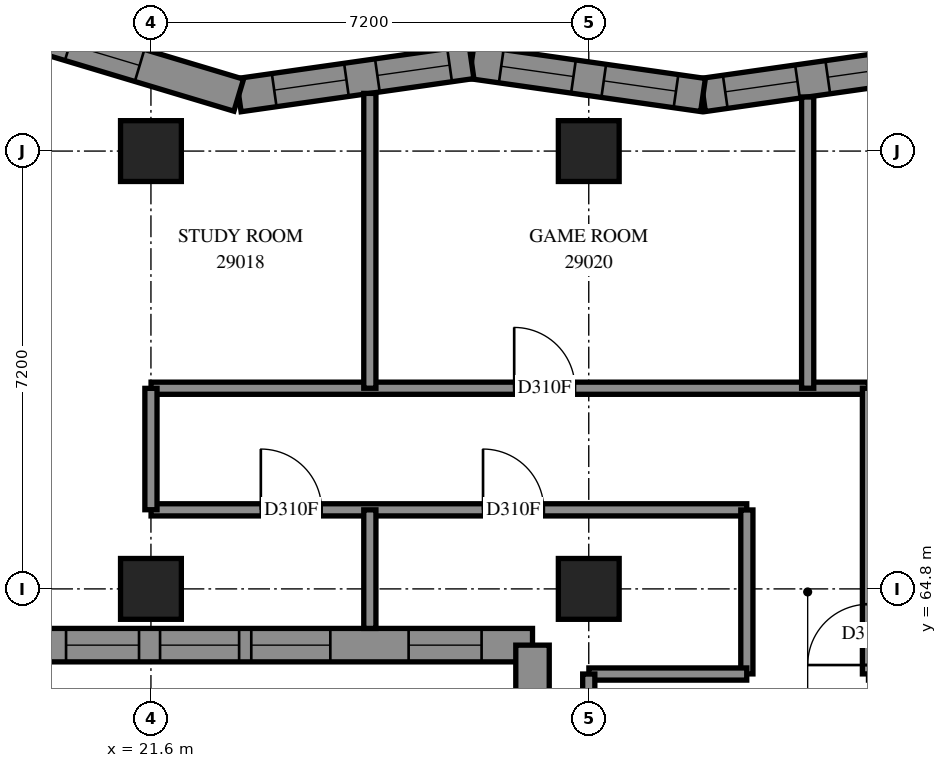
"""IFC4 building model, lengths in metres.
Left out: names, types, materials, properties, quantities, classifications, styles, units other than length and angle.
Written with IfcOpenShell. Run it as: python <this file> out.ifc"""

import sys

from ifc_helpers import new_model, si_unit, direction, frame, frame_2d, origin, origin_2d, place, context, subcontext, project, spatial, polyline, rectangle, outline, extrude, element, fill, save


model = new_model("IFC4")
c1 = context("Model", 3, precision=1e-05, world=origin(), true_north=direction((0.0, 1.0)))
c2 = subcontext(c1, "Body", "Model", "MODEL_VIEW")
j1 = project(units=[si_unit("LENGTHUNIT", "METRE"), si_unit("PLANEANGLEUNIT", "RADIAN")], contexts=[c1])
p1 = place(None, origin())
s1 = spatial("IfcSite", under=j1, at=p1, CompositionType="ELEMENT")
p2 = place(p1, origin())
s2 = spatial("IfcBuilding", under=s1, at=p2, CompositionType="ELEMENT")
p3 = place(p2, frame((0.0, 0.0, 108.4)))
s3 = spatial("IfcBuildingStorey", under=s2, at=p3, CompositionType="ELEMENT", Elevation=108.4)
for number, where, z_axis, x_axis in (
    (1, (21.6, 64.8, 0.0), (0.0, 0.0, 1.0), (1.0, 0.0, 0.0)),
    (2, (21.6, 72.0, 0.0), (0.0, 0.0, 1.0), (1.0, 0.0, 0.0)),
    (3, (28.8, 64.8, 0.0), (0.0, 0.0, 1.0), (1.0, 0.0, 0.0)),
    (4, (28.8, 72.0, 0.0), (0.0, 0.0, 1.0), (1.0, 0.0, 0.0)),
):
    element("IfcColumn", number, at=place(p3, frame(where, z_axis=z_axis, x_axis=x_axis)), inside=s3, PredefinedType="COLUMN", context=c2, shape_type="SweptSolid", body=[
        extrude(rectangle(XDim=1.0, YDim=1.0, at=origin_2d()), origin(), (0.0, 0.0, 1.0), 3.1),
    ])
p4 = place(p3, frame((34.486, 73.464, 0.0), z_axis=(0.0, 0.0, 1.0), x_axis=(-0.990016994, -0.1409480459, 0.0)))
e5 = element("IfcWall", 5, at=p4, inside=s3, PredefinedType="SOLIDWALL", context=c2, shape_type="SweptSolid", body=[
    extrude(outline(polyline([(-0.039, -0.275), (3.806, -0.275), (3.885, 0.275), (0.039, 0.275), (-0.039, -0.275)])), origin(), (0.0, 0.0, 1.0), 3.1),
])
p5 = place(p4, frame((0.573, 0.0, 0.5)))
e6 = element("IfcOpeningElement", 6, at=p5, cuts=e5, PredefinedType="OPENING", context=c2, shape_type="SweptSolid", body=[
    extrude(rectangle(XDim=1.2, YDim=2.45, at=frame_2d((0.6, 1.225))), frame((0.0, 0.285, 0.0), z_axis=(0.0, -1.0, 0.0), x_axis=(1.0, 0.0, 0.0)), (0.0, 0.0, 1.0), 0.57),
])
p6 = place(p4, frame((2.276, 0.0, 0.5)))
e7 = element("IfcOpeningElement", 7, at=p6, cuts=e5, PredefinedType="OPENING", context=c2, shape_type="SweptSolid", body=[
    extrude(rectangle(XDim=1.2, YDim=2.45, at=frame_2d((0.6, 1.225))), frame((0.0, 0.285, 0.0), z_axis=(0.0, -1.0, 0.0), x_axis=(1.0, 0.0, 0.0)), (0.0, 0.0, 1.0), 0.57),
])
p7 = place(p3, frame((30.679, 72.922, 0.0), z_axis=(0.0, 0.0, 1.0), x_axis=(-0.990016994, 0.1409480459, 0.0)))
e8 = element("IfcWall", 8, at=p7, inside=s3, PredefinedType="SOLIDWALL", context=c2, shape_type="SweptSolid", body=[
    extrude(outline(polyline([(0.039, -0.275), (3.885, -0.275), (3.806, 0.275), (-0.039, 0.275), (0.039, -0.275)])), origin(), (0.0, 0.0, 1.0), 3.1),
])
p8 = place(p7, frame((0.449, 0.0, 0.5)))
e9 = element("IfcOpeningElement", 9, at=p8, cuts=e8, PredefinedType="OPENING", context=c2, shape_type="SweptSolid", body=[
    extrude(rectangle(XDim=1.2, YDim=2.45, at=frame_2d((0.6, 1.225))), frame((0.0, 0.285, 0.0), z_axis=(0.0, -1.0, 0.0), x_axis=(1.0, 0.0, 0.0)), (0.0, 0.0, 1.0), 0.57),
])
p9 = place(p7, frame((2.152, 0.0, 0.5)))
e10 = element("IfcOpeningElement", 10, at=p9, cuts=e8, PredefinedType="OPENING", context=c2, shape_type="SweptSolid", body=[
    extrude(rectangle(XDim=1.2, YDim=2.45, at=frame_2d((0.6, 1.225))), frame((0.0, 0.285, 0.0), z_axis=(0.0, -1.0, 0.0), x_axis=(1.0, 0.0, 0.0)), (0.0, 0.0, 1.0), 0.57),
])
p10 = place(p3, frame((26.872, 73.464, 0.0), z_axis=(0.0, 0.0, 1.0), x_axis=(-0.9900171381, -0.1409470338, 0.0)))
e11 = element("IfcWall", 11, at=p10, inside=s3, PredefinedType="SOLIDWALL", context=c2, shape_type="SweptSolid", body=[
    extrude(outline(polyline([(-0.039, -0.275), (3.806, -0.275), (3.927, 0.275), (0.039, 0.275), (-0.039, -0.275)])), origin(), (0.0, 0.0, 1.0), 3.1),
])
p11 = place(p10, frame((0.364, 0.0, 0.5)))
e12 = element("IfcOpeningElement", 12, at=p11, cuts=e11, PredefinedType="OPENING", context=c2, shape_type="SweptSolid", body=[
    extrude(rectangle(XDim=1.2, YDim=2.45, at=frame_2d((0.6, 1.225))), frame((0.0, 0.285, 0.0), z_axis=(0.0, -1.0, 0.0), x_axis=(1.0, 0.0, 0.0)), (0.0, 0.0, 1.0), 0.57),
])
p12 = place(p10, frame((2.078, 0.0, 0.5)))
e13 = element("IfcOpeningElement", 13, at=p12, cuts=e11, PredefinedType="OPENING", context=c2, shape_type="SweptSolid", body=[
    extrude(rectangle(XDim=1.2, YDim=2.45, at=frame_2d((0.6, 1.225))), frame((0.0, 0.285, 0.0), z_axis=(0.0, -1.0, 0.0), x_axis=(1.0, 0.0, 0.0)), (0.0, 0.0, 1.0), 0.57),
])
p13 = place(p3, frame((23.044, 72.919, 0.0), z_axis=(0.0, 0.0, 1.0), x_axis=(-0.9578315412, 0.2873303652, 0.0)))
e14 = element("IfcWall", 14, at=p13, inside=s3, PredefinedType="SOLIDWALL", context=c2, shape_type="SweptSolid", body=[
    extrude(outline(polyline([(0.06, -0.275), (4.035, -0.275), (3.296, 0.275), (-0.06, 0.275), (0.06, -0.275)])), origin(), (0.0, 0.0, 1.0), 3.1),
])
p14 = place(p13, frame((1.702, 0.0, 0.5)))
e15 = element("IfcOpeningElement", 15, at=p14, cuts=e14, PredefinedType="OPENING", context=c2, shape_type="SweptSolid", body=[
    extrude(rectangle(XDim=1.2, YDim=2.45, at=frame_2d((0.6, 1.225))), frame((0.0, 0.285, 0.0), z_axis=(0.0, -1.0, 0.0), x_axis=(1.0, 0.0, 0.0)), (0.0, 0.0, 1.0), 0.57),
])
p15 = place(p3, frame((19.533, 63.875, 0.0), z_axis=(0.0, 0.0, 1.0), x_axis=(1.0, 0.0, 0.0)))
e16 = element("IfcWall", 16, at=p15, inside=s3, PredefinedType="SOLIDWALL", context=c2, shape_type="SweptSolid", body=[
    extrude(outline(polyline([(-0.275, -0.275), (8.067, -0.275), (8.617, 0.275), (0.275, 0.275), (-0.275, -0.275)])), origin(), (0.0, 0.0, 1.0), 3.1),
])
p16 = place(p15, frame((2.217, 0.0, 0.5)))
e17 = element("IfcOpeningElement", 17, at=p16, cuts=e16, PredefinedType="OPENING", context=c2, shape_type="SweptSolid", body=[
    extrude(rectangle(XDim=1.3, YDim=2.45, at=frame_2d((0.65, 1.225))), frame((0.0, 0.285, 0.0), z_axis=(0.0, -1.0, 0.0), x_axis=(1.0, 0.0, 0.0)), (0.0, 0.0, 1.0), 0.57),
])
p17 = place(p15, frame((3.717, 0.0, 0.5)))
e18 = element("IfcOpeningElement", 18, at=p17, cuts=e16, PredefinedType="OPENING", context=c2, shape_type="SweptSolid", body=[
    extrude(rectangle(XDim=1.3, YDim=2.45, at=frame_2d((0.65, 1.225))), frame((0.0, 0.285, 0.0), z_axis=(0.0, -1.0, 0.0), x_axis=(1.0, 0.0, 0.0)), (0.0, 0.0, 1.0), 0.57),
])
p18 = place(p15, frame((0.671, 0.0, 0.5)))
e19 = element("IfcOpeningElement", 19, at=p18, cuts=e16, PredefinedType="OPENING", context=c2, shape_type="SweptSolid", body=[
    extrude(rectangle(XDim=1.2, YDim=2.45, at=frame_2d((0.6, 1.225))), frame((0.0, 0.285, 0.0), z_axis=(0.0, -1.0, 0.0), x_axis=(1.0, 0.0, 0.0)), (0.0, 0.0, 1.0), 0.57),
])
p19 = place(p15, frame((6.304, 0.0, 0.5)))
e20 = element("IfcOpeningElement", 20, at=p19, cuts=e16, PredefinedType="OPENING", context=c2, shape_type="SweptSolid", body=[
    extrude(rectangle(XDim=1.2, YDim=2.45, at=frame_2d((0.6, 1.225))), frame((0.0, 0.285, 0.0), z_axis=(0.0, -1.0, 0.0), x_axis=(1.0, 0.0, 0.0)), (0.0, 0.0, 1.0), 0.57),
])
p20 = place(p3, frame((27.875, 63.875, 0.0), z_axis=(0.0, 0.0, 1.0), x_axis=(0.0, -1.0, 0.0)))
e21 = element("IfcWall", 21, at=p20, inside=s3, PredefinedType="SOLIDWALL", context=c2, shape_type="SweptSolid", body=[
    extrude(outline(polyline([(0.275, -0.275), (8.617, -0.275), (8.067, 0.275), (-0.275, 0.275), (0.275, -0.275)])), origin(), (0.0, 0.0, 1.0), 3.1),
])
p21 = place(p20, frame((3.325, 0.0, 0.5)))
e22 = element("IfcOpeningElement", 22, at=p21, cuts=e21, PredefinedType="OPENING", context=c2, shape_type="SweptSolid", body=[
    extrude(rectangle(XDim=1.3, YDim=2.45, at=frame_2d((0.65, 1.225))), frame((0.0, 0.285, 0.0), z_axis=(0.0, -1.0, 0.0), x_axis=(1.0, 0.0, 0.0)), (0.0, 0.0, 1.0), 0.57),
])
p22 = place(p20, frame((4.975, 0.0, 0.5)))
e23 = element("IfcOpeningElement", 23, at=p22, cuts=e21, PredefinedType="OPENING", context=c2, shape_type="SweptSolid", body=[
    extrude(rectangle(XDim=1.3, YDim=2.45, at=frame_2d((0.65, 1.225))), frame((0.0, 0.285, 0.0), z_axis=(0.0, -1.0, 0.0), x_axis=(1.0, 0.0, 0.0)), (0.0, 0.0, 1.0), 0.57),
])
p23 = place(p20, frame((0.838, 0.0, 0.5)))
e24 = element("IfcOpeningElement", 24, at=p23, cuts=e21, PredefinedType="OPENING", context=c2, shape_type="SweptSolid", body=[
    extrude(rectangle(XDim=1.2, YDim=2.45, at=frame_2d((0.6, 1.225))), frame((0.0, 0.285, 0.0), z_axis=(0.0, -1.0, 0.0), x_axis=(1.0, 0.0, 0.0)), (0.0, 0.0, 1.0), 0.57),
])
p24 = place(p20, frame((6.471, 0.0, 0.5)))
e25 = element("IfcOpeningElement", 25, at=p24, cuts=e21, PredefinedType="OPENING", context=c2, shape_type="SweptSolid", body=[
    extrude(rectangle(XDim=1.2, YDim=2.45, at=frame_2d((0.6, 1.225))), frame((0.0, 0.285, 0.0), z_axis=(0.0, -1.0, 0.0), x_axis=(1.0, 0.0, 0.0)), (0.0, 0.0, 1.0), 0.57),
])
p25 = place(p3, frame((21.602, 68.1, 0.0), z_axis=(0.0, 0.0, 1.0), x_axis=(1.0, 0.0, 0.0)))
e26 = element("IfcWall", 26, at=p25, inside=s3, PredefinedType="PARTITIONING", context=c2, shape_type="SweptSolid", body=[
    extrude(rectangle(XDim=11.798, YDim=0.2, at=frame_2d((5.899, 0.0))), origin(), (0.0, 0.0, 1.0), 3.1),
])
p26 = place(p25, frame((5.972, 0.0, 0.0)))
e27 = element("IfcOpeningElement", 27, at=p26, cuts=e26, PredefinedType="OPENING", context=c2, shape_type="SweptSolid", body=[
    extrude(rectangle(XDim=1.0, YDim=2.1, at=frame_2d((0.5, 1.05))), frame((0.0, 0.11, 0.0), z_axis=(0.0, -1.0, 0.0), x_axis=(1.0, 0.0, 0.0)), (0.0, 0.0, 1.0), 0.22),
])
p27 = place(p3, frame((21.602, 66.1, 0.0), z_axis=(0.0, 0.0, 1.0), x_axis=(1.0, 0.0, 0.0)))
e28 = element("IfcWall", 28, at=p27, inside=s3, PredefinedType="PARTITIONING", context=c2, shape_type="SweptSolid", body=[
    extrude(rectangle(XDim=9.796, YDim=0.2, at=frame_2d((4.898, 0.0))), origin(), (0.0, 0.0, 1.0), 3.1),
])
p28 = place(p27, frame((1.805, 0.0, 0.0)))
e29 = element("IfcOpeningElement", 29, at=p28, cuts=e28, PredefinedType="OPENING", context=c2, shape_type="SweptSolid", body=[
    extrude(rectangle(XDim=1.0, YDim=2.1, at=frame_2d((0.5, 1.05))), frame((0.0, 0.11, 0.0), z_axis=(0.0, -1.0, 0.0), x_axis=(1.0, 0.0, 0.0)), (0.0, 0.0, 1.0), 0.22),
])
p29 = place(p27, frame((5.459, 0.0, 0.0)))
e30 = element("IfcOpeningElement", 30, at=p29, cuts=e28, PredefinedType="OPENING", context=c2, shape_type="SweptSolid", body=[
    extrude(rectangle(XDim=1.0, YDim=2.1, at=frame_2d((0.5, 1.05))), frame((0.0, 0.11, 0.0), z_axis=(0.0, -1.0, 0.0), x_axis=(1.0, 0.0, 0.0)), (0.0, 0.0, 1.0), 0.22),
])
p30 = place(p3, frame((25.2, 68.1, 0.0), z_axis=(0.0, 0.0, 1.0), x_axis=(0.0, 1.0, 0.0)))
e31 = element("IfcWall", 31, at=p30, inside=s3, PredefinedType="PARTITIONING", context=c2, shape_type="SweptSolid", body=[
    extrude(rectangle(XDim=4.848, YDim=0.2, at=frame_2d((2.424, 0.0))), origin(), (0.0, 0.0, 1.0), 3.1),
])
p31 = place(p3, frame((32.4, 68.1, 0.0), z_axis=(0.0, 0.0, 1.0), x_axis=(0.0, 1.0, 0.0)))
e32 = element("IfcWall", 32, at=p31, inside=s3, PredefinedType="PARTITIONING", context=c2, shape_type="SweptSolid", body=[
    extrude(rectangle(XDim=4.79, YDim=0.2, at=frame_2d((2.395, 0.0))), origin(), (0.0, 0.0, 1.0), 3.1),
])
p32 = place(p3, frame((33.4, 63.402, 0.0), z_axis=(0.0, 0.0, 1.0), x_axis=(0.0, 1.0, 0.0)))
e33 = element("IfcWall", 33, at=p32, inside=s3, PredefinedType="PARTITIONING", context=c2, shape_type="SweptSolid", body=[
    extrude(rectangle(XDim=4.698, YDim=0.2, at=frame_2d((2.349, 0.0))), origin(), (0.0, 0.0, 1.0), 3.1),
])
p33 = place(p32, frame((0.146, 0.0, 0.0)))
e34 = element("IfcOpeningElement", 34, at=p33, cuts=e33, PredefinedType="OPENING", context=c2, shape_type="SweptSolid", body=[
    extrude(rectangle(XDim=1.0, YDim=2.1, at=frame_2d((0.5, 1.05))), frame((0.0, 0.11, 0.0), z_axis=(0.0, -1.0, 0.0), x_axis=(1.0, 0.0, 0.0)), (0.0, 0.0, 1.0), 0.22),
])
p34 = place(p3, frame((31.4, 63.402, 0.0), z_axis=(0.0, 0.0, 1.0), x_axis=(0.0, 1.0, 0.0)))
e35 = element("IfcWall", 35, at=p34, inside=s3, PredefinedType="PARTITIONING", context=c2, shape_type="SweptSolid", body=[
    extrude(rectangle(XDim=2.696, YDim=0.2, at=frame_2d((1.348, 0.0))), origin(), (0.0, 0.0, 1.0), 3.1),
])
p35 = place(p3, frame((28.802, 63.4, 0.0), z_axis=(0.0, 0.0, 1.0), x_axis=(1.0, 0.0, 0.0)))
e36 = element("IfcWall", 36, at=p35, inside=s3, PredefinedType="PARTITIONING", context=c2, shape_type="SweptSolid", body=[
    extrude(rectangle(XDim=2.596, YDim=0.2, at=frame_2d((1.298, 0.0))), origin(), (0.0, 0.0, 1.0), 3.1),
])
p36 = place(p3, frame((28.8, 61.4, 0.0), z_axis=(0.0, 0.0, 1.0), x_axis=(0.0, 1.0, 0.0)))
e37 = element("IfcWall", 37, at=p36, inside=s3, PredefinedType="PARTITIONING", context=c2, shape_type="SweptSolid", body=[
    extrude(rectangle(XDim=2.0, YDim=0.2, at=frame_2d((1.0, 0.0))), origin(), (0.0, 0.0, 1.0), 2.6),
])
p37 = place(p3, frame((21.6, 66.102, 0.0), z_axis=(0.0, 0.0, 1.0), x_axis=(0.0, 1.0, 0.0)))
e38 = element("IfcWall", 38, at=p37, inside=s3, PredefinedType="PARTITIONING", context=c2, shape_type="SweptSolid", body=[
    extrude(rectangle(XDim=1.996, YDim=0.2, at=frame_2d((0.998, 0.0))), origin(), (0.0, 0.0, 1.0), 2.6),
])
p38 = place(p3, frame((25.2, 64.15, 0.0), z_axis=(0.0, 0.0, 1.0), x_axis=(0.0, 1.0, 0.0)))
e39 = element("IfcWall", 39, at=p38, inside=s3, PredefinedType="PARTITIONING", context=c2, shape_type="SweptSolid", body=[
    extrude(rectangle(XDim=1.95, YDim=0.2, at=frame_2d((0.975, 0.0))), origin(), (0.0, 0.0, 1.0), 3.1),
])
p39 = place(p5, origin())
e40 = element("IfcWindow", 40, at=p39, inside=s3, PartitioningType="SINGLE_PANEL", PredefinedType="WINDOW", context=c2, shape_type="SweptSolid", body=[
    extrude(rectangle(XDim=1.2, YDim=2.45, at=frame_2d((0.6, 1.225))), frame((0.0, 0.155, 0.0), z_axis=(0.0, -1.0, 0.0), x_axis=(1.0, 0.0, 0.0)), (0.0, 0.0, 1.0), 0.06),
])
fill(e6, e40)
p40 = place(p6, origin())
e41 = element("IfcWindow", 41, at=p40, inside=s3, PartitioningType="SINGLE_PANEL", PredefinedType="WINDOW", context=c2, shape_type="SweptSolid", body=[
    extrude(rectangle(XDim=1.2, YDim=2.45, at=frame_2d((0.6, 1.225))), frame((0.0, 0.155, 0.0), z_axis=(0.0, -1.0, 0.0), x_axis=(1.0, 0.0, 0.0)), (0.0, 0.0, 1.0), 0.06),
])
fill(e7, e41)
p41 = place(p8, origin())
e42 = element("IfcWindow", 42, at=p41, inside=s3, PartitioningType="SINGLE_PANEL", PredefinedType="WINDOW", context=c2, shape_type="SweptSolid", body=[
    extrude(rectangle(XDim=1.2, YDim=2.45, at=frame_2d((0.6, 1.225))), frame((0.0, 0.155, 0.0), z_axis=(0.0, -1.0, 0.0), x_axis=(1.0, 0.0, 0.0)), (0.0, 0.0, 1.0), 0.06),
])
fill(e9, e42)
p42 = place(p9, origin())
e43 = element("IfcWindow", 43, at=p42, inside=s3, PartitioningType="SINGLE_PANEL", PredefinedType="WINDOW", context=c2, shape_type="SweptSolid", body=[
    extrude(rectangle(XDim=1.2, YDim=2.45, at=frame_2d((0.6, 1.225))), frame((0.0, 0.155, 0.0), z_axis=(0.0, -1.0, 0.0), x_axis=(1.0, 0.0, 0.0)), (0.0, 0.0, 1.0), 0.06),
])
fill(e10, e43)
p43 = place(p11, origin())
e44 = element("IfcWindow", 44, at=p43, inside=s3, PartitioningType="SINGLE_PANEL", PredefinedType="WINDOW", context=c2, shape_type="SweptSolid", body=[
    extrude(rectangle(XDim=1.2, YDim=2.45, at=frame_2d((0.6, 1.225))), frame((0.0, 0.155, 0.0), z_axis=(0.0, -1.0, 0.0), x_axis=(1.0, 0.0, 0.0)), (0.0, 0.0, 1.0), 0.06),
])
fill(e12, e44)
p44 = place(p12, origin())
e45 = element("IfcWindow", 45, at=p44, inside=s3, PartitioningType="SINGLE_PANEL", PredefinedType="WINDOW", context=c2, shape_type="SweptSolid", body=[
    extrude(rectangle(XDim=1.2, YDim=2.45, at=frame_2d((0.6, 1.225))), frame((0.0, 0.155, 0.0), z_axis=(0.0, -1.0, 0.0), x_axis=(1.0, 0.0, 0.0)), (0.0, 0.0, 1.0), 0.06),
])
fill(e13, e45)
p45 = place(p14, origin())
e46 = element("IfcWindow", 46, at=p45, inside=s3, PartitioningType="SINGLE_PANEL", PredefinedType="WINDOW", context=c2, shape_type="SweptSolid", body=[
    extrude(rectangle(XDim=1.2, YDim=2.45, at=frame_2d((0.6, 1.225))), frame((0.0, 0.155, 0.0), z_axis=(0.0, -1.0, 0.0), x_axis=(1.0, 0.0, 0.0)), (0.0, 0.0, 1.0), 0.06),
])
fill(e15, e46)
p46 = place(p16, origin())
e47 = element("IfcWindow", 47, at=p46, inside=s3, PartitioningType="SINGLE_PANEL", PredefinedType="WINDOW", context=c2, shape_type="SweptSolid", body=[
    extrude(rectangle(XDim=1.3, YDim=2.45, at=frame_2d((0.65, 1.225))), frame((0.0, 0.155, 0.0), z_axis=(0.0, -1.0, 0.0), x_axis=(1.0, 0.0, 0.0)), (0.0, 0.0, 1.0), 0.06),
])
fill(e17, e47)
p47 = place(p17, origin())
e48 = element("IfcWindow", 48, at=p47, inside=s3, PartitioningType="SINGLE_PANEL", PredefinedType="WINDOW", context=c2, shape_type="SweptSolid", body=[
    extrude(rectangle(XDim=1.3, YDim=2.45, at=frame_2d((0.65, 1.225))), frame((0.0, 0.155, 0.0), z_axis=(0.0, -1.0, 0.0), x_axis=(1.0, 0.0, 0.0)), (0.0, 0.0, 1.0), 0.06),
])
fill(e18, e48)
p48 = place(p18, origin())
e49 = element("IfcWindow", 49, at=p48, inside=s3, PartitioningType="SINGLE_PANEL", PredefinedType="WINDOW", context=c2, shape_type="SweptSolid", body=[
    extrude(rectangle(XDim=1.2, YDim=2.45, at=frame_2d((0.6, 1.225))), frame((0.0, 0.155, 0.0), z_axis=(0.0, -1.0, 0.0), x_axis=(1.0, 0.0, 0.0)), (0.0, 0.0, 1.0), 0.06),
])
fill(e19, e49)
p49 = place(p19, origin())
e50 = element("IfcWindow", 50, at=p49, inside=s3, PartitioningType="SINGLE_PANEL", PredefinedType="WINDOW", context=c2, shape_type="SweptSolid", body=[
    extrude(rectangle(XDim=1.2, YDim=2.45, at=frame_2d((0.6, 1.225))), frame((0.0, 0.155, 0.0), z_axis=(0.0, -1.0, 0.0), x_axis=(1.0, 0.0, 0.0)), (0.0, 0.0, 1.0), 0.06),
])
fill(e20, e50)
p50 = place(p28, origin())
e51 = element("IfcDoor", 51, at=p50, inside=s3, OperationType="SINGLE_SWING_RIGHT", PredefinedType="DOOR", context=c2, shape_type="SweptSolid", body=[
    extrude(rectangle(XDim=1.0, YDim=2.1, at=frame_2d((0.5, 1.05))), frame((0.0, 0.025, 0.0), z_axis=(0.0, -1.0, 0.0), x_axis=(1.0, 0.0, 0.0)), (0.0, 0.0, 1.0), 0.05),
])
fill(e29, e51)
p51 = place(p29, origin())
e52 = element("IfcDoor", 52, at=p51, inside=s3, OperationType="SINGLE_SWING_RIGHT", PredefinedType="DOOR", context=c2, shape_type="SweptSolid", body=[
    extrude(rectangle(XDim=1.0, YDim=2.1, at=frame_2d((0.5, 1.05))), frame((0.0, 0.025, 0.0), z_axis=(0.0, -1.0, 0.0), x_axis=(1.0, 0.0, 0.0)), (0.0, 0.0, 1.0), 0.05),
])
fill(e30, e52)
p52 = place(p26, origin())
e53 = element("IfcDoor", 53, at=p52, inside=s3, OperationType="SINGLE_SWING_LEFT", PredefinedType="DOOR", context=c2, shape_type="SweptSolid", body=[
    extrude(rectangle(XDim=1.0, YDim=2.1, at=frame_2d((0.5, 1.05))), frame((0.0, 0.025, 0.0), z_axis=(0.0, -1.0, 0.0), x_axis=(1.0, 0.0, 0.0)), (0.0, 0.0, 1.0), 0.05),
])
fill(e27, e53)
p53 = place(p33, origin())
e54 = element("IfcDoor", 54, at=p53, inside=s3, OperationType="SINGLE_SWING_LEFT", PredefinedType="DOOR", context=c2, shape_type="SweptSolid", body=[
    extrude(rectangle(XDim=1.0, YDim=2.1, at=frame_2d((0.5, 1.05))), frame((0.0, 0.025, 0.0), z_axis=(0.0, -1.0, 0.0), x_axis=(1.0, 0.0, 0.0)), (0.0, 0.0, 1.0), 0.05),
])
fill(e34, e54)
save(model, sys.argv[1])
